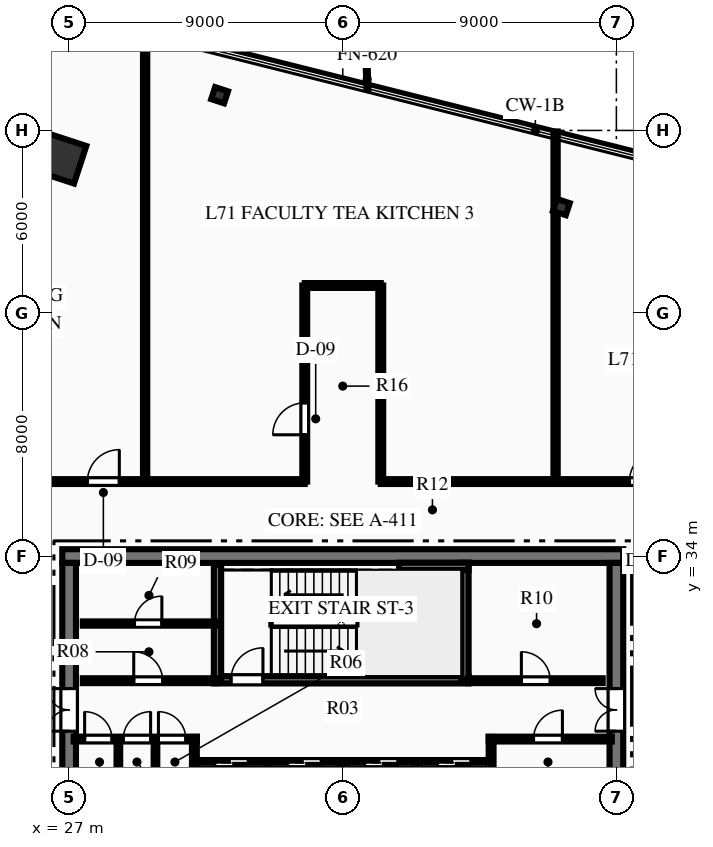
"""IFC4 building model, lengths in metres.
Left out: names, types, materials, properties, quantities, classifications, styles, units other than length and angle.
Written with IfcOpenShell. Run it as: python <this file> out.ifc"""

import sys

from ifc_helpers import new_model, si_unit, direction, frame, frame_2d, origin, origin_2d, place, context, subcontext, project, spatial, rectangle, hollow_rectangle, i_section, extrude, element, fill, save


model = new_model("IFC4")
c1 = context("Model", 3, precision=1e-05, world=origin(), true_north=direction((0.0, 1.0)))
c2 = subcontext(c1, "Body", "Model", "MODEL_VIEW")
j1 = project(units=[si_unit("LENGTHUNIT", "METRE"), si_unit("PLANEANGLEUNIT", "RADIAN")], contexts=[c1])
p1 = place(None, origin())
s1 = spatial("IfcSite", under=j1, at=p1, CompositionType="ELEMENT")
p2 = place(p1, origin())
s2 = spatial("IfcBuilding", under=s1, at=p2, CompositionType="ELEMENT")
p3 = place(p2, frame((0.0, 0.0, 282.45)))
s3 = spatial("IfcBuildingStorey", under=s2, at=p3, CompositionType="ELEMENT", Elevation=282.45)
p4 = place(p3, frame((26.775, 34.0, 0.0), z_axis=(0.0, 0.0, 1.0), x_axis=(1.0, 0.0, 0.0)))
e1 = element("IfcWall", 1, at=p4, inside=s3, PredefinedType="SHEAR", context=c2, shape_type="SweptSolid", body=[
    extrude(rectangle(XDim=18.45, YDim=0.45, at=frame_2d((9.225, 0.0))), origin(), (0.0, 0.0, 1.0), 3.75),
])
p5 = place(p3, frame((27.0, 18.225, 0.0), z_axis=(0.0, 0.0, 1.0), x_axis=(0.0, 1.0, 0.0)))
e2 = element("IfcWall", 2, at=p5, inside=s3, PredefinedType="SHEAR", context=c2, shape_type="SweptSolid", body=[
    extrude(rectangle(XDim=15.55, YDim=0.45, at=frame_2d((7.775, 0.0))), origin(), (0.0, 0.0, 1.0), 3.75),
])
p6 = place(p5, frame((10.015, 0.0, 0.0)))
e3 = element("IfcOpeningElement", 3, at=p6, cuts=e2, PredefinedType="OPENING", context=c2, shape_type="SweptSolid", body=[
    extrude(rectangle(XDim=1.4, YDim=2.2, at=frame_2d((0.7, 1.1))), frame((0.0, 0.235, 0.0), z_axis=(0.0, -1.0, 0.0), x_axis=(1.0, 0.0, 0.0)), (0.0, 0.0, 1.0), 0.47),
])
p7 = place(p3, frame((45.0, 18.225, 0.0), z_axis=(0.0, 0.0, 1.0), x_axis=(0.0, 1.0, 0.0)))
e4 = element("IfcWall", 4, at=p7, inside=s3, PredefinedType="SHEAR", context=c2, shape_type="SweptSolid", body=[
    extrude(rectangle(XDim=15.55, YDim=0.45, at=frame_2d((7.775, 0.0))), origin(), (0.0, 0.0, 1.0), 3.75),
])
p8 = place(p7, frame((10.015, 0.0, 0.0)))
e5 = element("IfcOpeningElement", 5, at=p8, cuts=e4, PredefinedType="OPENING", context=c2, shape_type="SweptSolid", body=[
    extrude(rectangle(XDim=1.4, YDim=2.2, at=frame_2d((0.7, 1.1))), frame((0.0, 0.235, 0.0), z_axis=(0.0, -1.0, 0.0), x_axis=(1.0, 0.0, 0.0)), (0.0, 0.0, 1.0), 0.47),
])
p9 = place(p3, frame((31.76, 29.93, 0.0), z_axis=(0.0, 0.0, 1.0), x_axis=(1.0, 0.0, 0.0)))
e6 = element("IfcWall", 6, at=p9, inside=s3, PredefinedType="SHEAR", context=c2, shape_type="SweptSolid", body=[
    extrude(rectangle(XDim=8.38, YDim=0.24, at=frame_2d((4.19, 0.0))), origin(), (0.0, 0.0, 1.0), 3.75),
])
p10 = place(p9, frame((0.565, 0.0, 0.0)))
e7 = element("IfcOpeningElement", 7, at=p10, cuts=e6, PredefinedType="OPENING", context=c2, shape_type="SweptSolid", body=[
    extrude(rectangle(XDim=1.05, YDim=2.15, at=frame_2d((0.525, 1.075))), frame((0.0, 0.13, 0.0), z_axis=(0.0, -1.0, 0.0), x_axis=(1.0, 0.0, 0.0)), (0.0, 0.0, 1.0), 0.26),
])
p11 = place(p3, frame((31.88, 29.93, 0.0), z_axis=(0.0, 0.0, 1.0), x_axis=(0.0, 1.0, 0.0)))
e8 = element("IfcWall", 8, at=p11, inside=s3, PredefinedType="SHEAR", context=c2, shape_type="SweptSolid", body=[
    extrude(rectangle(XDim=3.79, YDim=0.24, at=frame_2d((1.895, 0.0))), origin(), (0.0, 0.0, 1.0), 3.75),
])
p12 = place(p3, frame((40.02, 29.93, 0.0), z_axis=(0.0, 0.0, 1.0), x_axis=(0.0, 1.0, 0.0)))
e9 = element("IfcWall", 9, at=p12, inside=s3, PredefinedType="SHEAR", context=c2, shape_type="SweptSolid", body=[
    extrude(rectangle(XDim=3.85, YDim=0.24, at=frame_2d((1.925, 0.0))), origin(), (0.0, 0.0, 1.0), 3.75),
])
p13 = place(p3, frame((37.85, 33.66, 0.0), z_axis=(0.0, 0.0, 1.0), x_axis=(1.0, 0.0, 0.0)))
e10 = element("IfcWall", 10, at=p13, inside=s3, PredefinedType="SHEAR", context=c2, shape_type="SweptSolid", body=[
    extrude(rectangle(XDim=2.29, YDim=0.24, at=frame_2d((1.145, 0.0))), origin(), (0.0, 0.0, 1.0), 3.75),
])
p14 = place(p3, frame((26.745, 47.073, 0.0), z_axis=(0.0, 0.0, 1.0), x_axis=(0.311008203279, 0.950407227189, 0.0)))
e11 = element("IfcColumn", 11, at=p14, inside=s3, PredefinedType="COLUMN", context=c2, shape_type="SweptSolid", body=[
    extrude(hollow_rectangle(XDim=1.3, YDim=1.3, WallThickness=0.06, at=origin_2d()), origin(), (0.0, 0.0, 1.0), 3.75),
])
for number, where, z_axis, x_axis in (
    (12, (43.19, 45.48, 0.0), (0.0, 0.0, 1.0), (0.311, 0.95, 0.0)),
    (13, (31.949, 49.158, 0.0), (0.0, 0.0, 1.0), (0.311, 0.95, 0.0)),
):
    element("IfcColumn", number, at=place(p3, frame(where, z_axis=z_axis, x_axis=x_axis)), inside=s3, PredefinedType="COLUMN", context=c2, shape_type="SweptSolid", body=[
        extrude(i_section(OverallWidth=0.416, OverallDepth=0.445, WebThickness=0.039, FlangeThickness=0.063, at=origin_2d()), origin(), (0.0, 0.0, 1.0), 3.75),
    ])
p15 = place(p3, frame((27.15, 27.98, 0.0), z_axis=(0.0, 0.0, 1.0), x_axis=(1.0, 0.0, 0.0)))
e14 = element("IfcWall", 14, at=p15, inside=s3, PredefinedType="PARTITIONING", context=c2, shape_type="SweptSolid", body=[
    extrude(rectangle(XDim=4.05, YDim=0.16, at=frame_2d((2.025, 0.0))), origin(), (0.0, 0.0, 1.0), 3.48),
])
p16 = place(p15, frame((0.36, 0.0, 0.0)))
e15 = element("IfcOpeningElement", 15, at=p16, cuts=e14, PredefinedType="OPENING", context=c2, shape_type="SweptSolid", body=[
    extrude(rectangle(XDim=0.9, YDim=2.15, at=frame_2d((0.45, 1.075))), frame((0.0, 0.09, 0.0), z_axis=(0.0, -1.0, 0.0), x_axis=(1.0, 0.0, 0.0)), (0.0, 0.0, 1.0), 0.18),
])
p17 = place(p15, frame((1.63, 0.0, 0.0)))
e16 = element("IfcOpeningElement", 16, at=p17, cuts=e14, PredefinedType="OPENING", context=c2, shape_type="SweptSolid", body=[
    extrude(rectangle(XDim=0.9, YDim=2.15, at=frame_2d((0.45, 1.075))), frame((0.0, 0.09, 0.0), z_axis=(0.0, -1.0, 0.0), x_axis=(1.0, 0.0, 0.0)), (0.0, 0.0, 1.0), 0.18),
])
p18 = place(p15, frame((2.788, 0.0, 0.0)))
e17 = element("IfcOpeningElement", 17, at=p18, cuts=e14, PredefinedType="OPENING", context=c2, shape_type="SweptSolid", body=[
    extrude(rectangle(XDim=0.9, YDim=2.15, at=frame_2d((0.45, 1.075))), frame((0.0, 0.09, 0.0), z_axis=(0.0, -1.0, 0.0), x_axis=(1.0, 0.0, 0.0)), (0.0, 0.0, 1.0), 0.18),
])
p19 = place(p3, frame((31.12, 26.54, 0.0), z_axis=(0.0, 0.0, 1.0), x_axis=(0.0, 1.0, 0.0)))
e18 = element("IfcWall", 18, at=p19, inside=s3, PredefinedType="PARTITIONING", context=c2, shape_type="SweptSolid", body=[
    extrude(rectangle(XDim=1.51, YDim=0.16, at=frame_2d((0.755, 0.0))), origin(), (0.0, 0.0, 1.0), 3.48),
])
p20 = place(p3, frame((40.8, 27.98, 0.0), z_axis=(0.0, 0.0, 1.0), x_axis=(1.0, 0.0, 0.0)))
e19 = element("IfcWall", 19, at=p20, inside=s3, PredefinedType="PARTITIONING", context=c2, shape_type="SweptSolid", body=[
    extrude(rectangle(XDim=4.05, YDim=0.16, at=frame_2d((2.025, 0.0))), origin(), (0.0, 0.0, 1.0), 3.48),
])
p21 = place(p20, frame((1.475, 0.0, 0.0)))
e20 = element("IfcOpeningElement", 20, at=p21, cuts=e19, PredefinedType="OPENING", context=c2, shape_type="SweptSolid", body=[
    extrude(rectangle(XDim=0.95, YDim=2.15, at=frame_2d((0.475, 1.075))), frame((0.0, 0.09, 0.0), z_axis=(0.0, -1.0, 0.0), x_axis=(1.0, 0.0, 0.0)), (0.0, 0.0, 1.0), 0.18),
])
p22 = place(p3, frame((40.88, 26.54, 0.0), z_axis=(0.0, 0.0, 1.0), x_axis=(0.0, 1.0, 0.0)))
e21 = element("IfcWall", 21, at=p22, inside=s3, PredefinedType="PARTITIONING", context=c2, shape_type="SweptSolid", body=[
    extrude(rectangle(XDim=1.51, YDim=0.16, at=frame_2d((0.755, 0.0))), origin(), (0.0, 0.0, 1.0), 3.48),
])
for number, where, z_axis, x_axis in (
    (22, (28.62, 26.54, 0.0), (0.0, 0.0, 1.0), (0.0, 1.0, 0.0)),
    (23, (29.84, 26.54, 0.0), (0.0, 0.0, 1.0), (0.0, 1.0, 0.0)),
):
    element("IfcWall", number, at=place(p3, frame(where, z_axis=z_axis, x_axis=x_axis)), inside=s3, PredefinedType="PARTITIONING", context=c2, shape_type="SweptSolid", body=[
        extrude(rectangle(XDim=1.44, YDim=0.12, at=frame_2d((0.72, 0.0))), origin(), (0.0, 0.0, 1.0), 3.48),
    ])
p23 = place(p3, frame((27.45, 29.9, 0.0), z_axis=(0.0, 0.0, 1.0), x_axis=(1.0, 0.0, 0.0)))
e24 = element("IfcWall", 24, at=p23, inside=s3, PredefinedType="PARTITIONING", context=c2, shape_type="SweptSolid", body=[
    extrude(rectangle(XDim=4.43, YDim=0.16, at=frame_2d((2.215, 0.0))), origin(), (0.0, 0.0, 1.0), 3.48),
])
p24 = place(p23, frame((1.675, 0.0, 0.0)))
e25 = element("IfcOpeningElement", 25, at=p24, cuts=e24, PredefinedType="OPENING", context=c2, shape_type="SweptSolid", body=[
    extrude(rectangle(XDim=0.95, YDim=2.15, at=frame_2d((0.475, 1.075))), frame((0.0, 0.09, 0.0), z_axis=(0.0, -1.0, 0.0), x_axis=(1.0, 0.0, 0.0)), (0.0, 0.0, 1.0), 0.18),
])
p25 = place(p3, frame((27.45, 31.78, 0.0), z_axis=(0.0, 0.0, 1.0), x_axis=(1.0, 0.0, 0.0)))
e26 = element("IfcWall", 26, at=p25, inside=s3, PredefinedType="PARTITIONING", context=c2, shape_type="SweptSolid", body=[
    extrude(rectangle(XDim=4.35, YDim=0.14, at=frame_2d((2.175, 0.0))), origin(), (0.0, 0.0, 1.0), 3.48),
])
p26 = place(p25, frame((1.7, 0.0, 0.0)))
e27 = element("IfcOpeningElement", 27, at=p26, cuts=e26, PredefinedType="OPENING", context=c2, shape_type="SweptSolid", body=[
    extrude(rectangle(XDim=0.9, YDim=2.15, at=frame_2d((0.45, 1.075))), frame((0.0, 0.08, 0.0), z_axis=(0.0, -1.0, 0.0), x_axis=(1.0, 0.0, 0.0)), (0.0, 0.0, 1.0), 0.16),
])
p27 = place(p3, frame((40.12, 29.9, 0.0), z_axis=(0.0, 0.0, 1.0), x_axis=(1.0, 0.0, 0.0)))
e28 = element("IfcWall", 28, at=p27, inside=s3, PredefinedType="PARTITIONING", context=c2, shape_type="SweptSolid", body=[
    extrude(rectangle(XDim=4.43, YDim=0.16, at=frame_2d((2.215, 0.0))), origin(), (0.0, 0.0, 1.0), 3.48),
])
p28 = place(p27, frame((1.755, 0.0, 0.0)))
e29 = element("IfcOpeningElement", 29, at=p28, cuts=e28, PredefinedType="OPENING", context=c2, shape_type="SweptSolid", body=[
    extrude(rectangle(XDim=0.95, YDim=2.15, at=frame_2d((0.475, 1.075))), frame((0.0, 0.09, 0.0), z_axis=(0.0, -1.0, 0.0), x_axis=(1.0, 0.0, 0.0)), (0.0, 0.0, 1.0), 0.18),
])
p29 = place(p3, frame((31.2, 27.2, 0.0), z_axis=(0.0, 0.0, 1.0), x_axis=(1.0, 0.0, 0.0)))
e30 = element("IfcWall", 30, at=p29, inside=s3, PredefinedType="PARTITIONING", context=c2, shape_type="SweptSolid", body=[
    extrude(rectangle(XDim=9.6, YDim=0.18, at=frame_2d((4.8, 0.0))), origin(), (0.0, 0.0, 1.0), 3.48),
])
p30 = place(p29, frame((0.59, 0.0, 0.0)))
e31 = element("IfcOpeningElement", 31, at=p30, cuts=e30, PredefinedType="OPENING", context=c2, shape_type="SweptSolid", body=[
    extrude(rectangle(XDim=1.1, YDim=2.15, at=frame_2d((0.55, 1.075))), frame((0.0, 0.1, 0.0), z_axis=(0.0, -1.0, 0.0), x_axis=(1.0, 0.0, 0.0)), (0.0, 0.0, 1.0), 0.2),
])
p31 = place(p29, frame((2.99, 0.0, 0.0)))
e32 = element("IfcOpeningElement", 32, at=p31, cuts=e30, PredefinedType="OPENING", context=c2, shape_type="SweptSolid", body=[
    extrude(rectangle(XDim=1.1, YDim=2.15, at=frame_2d((0.55, 1.075))), frame((0.0, 0.1, 0.0), z_axis=(0.0, -1.0, 0.0), x_axis=(1.0, 0.0, 0.0)), (0.0, 0.0, 1.0), 0.2),
])
p32 = place(p29, frame((5.51, 0.0, 0.0)))
e33 = element("IfcOpeningElement", 33, at=p32, cuts=e30, PredefinedType="OPENING", context=c2, shape_type="SweptSolid", body=[
    extrude(rectangle(XDim=1.1, YDim=2.15, at=frame_2d((0.55, 1.075))), frame((0.0, 0.1, 0.0), z_axis=(0.0, -1.0, 0.0), x_axis=(1.0, 0.0, 0.0)), (0.0, 0.0, 1.0), 0.2),
])
p33 = place(p29, frame((7.91, 0.0, 0.0)))
e34 = element("IfcOpeningElement", 34, at=p33, cuts=e30, PredefinedType="OPENING", context=c2, shape_type="SweptSolid", body=[
    extrude(rectangle(XDim=1.1, YDim=2.15, at=frame_2d((0.55, 1.075))), frame((0.0, 0.1, 0.0), z_axis=(0.0, -1.0, 0.0), x_axis=(1.0, 0.0, 0.0)), (0.0, 0.0, 1.0), 0.2),
])
for number, where, z_axis, x_axis in (
    (35, (33.54, 25.3, 0.0), (0.0, 0.0, 1.0), (0.0, 1.0, 0.0)),
    (36, (36.0, 25.3, 0.0), (0.0, 0.0, 1.0), (0.0, 1.0, 0.0)),
    (37, (38.46, 25.3, 0.0), (0.0, 0.0, 1.0), (0.0, 1.0, 0.0)),
):
    element("IfcWall", number, at=place(p3, frame(where, z_axis=z_axis, x_axis=x_axis)), inside=s3, PredefinedType="PARTITIONING", context=c2, shape_type="SweptSolid", body=[
        extrude(rectangle(XDim=1.9, YDim=0.18, at=frame_2d((0.95, 0.0))), origin(), (0.0, 0.0, 1.0), 3.48),
    ])
p34 = place(p3, frame((24.5, 36.45, 0.0), z_axis=(0.0, 0.0, 1.0), x_axis=(1.0, 0.0, 0.0)))
e38 = element("IfcWall", 38, at=p34, inside=s3, PredefinedType="PARTITIONING", context=c2, shape_type="SweptSolid", body=[
    extrude(rectangle(XDim=10.25, YDim=0.16, at=frame_2d((5.125, 0.0))), origin(), (0.0, 0.0, 1.0), 3.48),
])
p35 = place(p34, frame((3.101, 0.0, 0.0)))
e39 = element("IfcOpeningElement", 39, at=p35, cuts=e38, PredefinedType="OPENING", context=c2, shape_type="SweptSolid", body=[
    extrude(rectangle(XDim=1.05, YDim=2.15, at=frame_2d((0.525, 1.075))), frame((0.0, 0.09, 0.0), z_axis=(0.0, -1.0, 0.0), x_axis=(1.0, 0.0, 0.0)), (0.0, 0.0, 1.0), 0.18),
])
p36 = place(p3, frame((37.25, 36.45, 0.0), z_axis=(0.0, 0.0, 1.0), x_axis=(1.0, 0.0, 0.0)))
e40 = element("IfcWall", 40, at=p36, inside=s3, PredefinedType="PARTITIONING", context=c2, shape_type="SweptSolid", body=[
    extrude(rectangle(XDim=10.25, YDim=0.16, at=frame_2d((5.125, 0.0))), origin(), (0.0, 0.0, 1.0), 3.48),
])
p37 = place(p36, frame((8.179, 0.0, 0.0)))
e41 = element("IfcOpeningElement", 41, at=p37, cuts=e40, PredefinedType="OPENING", context=c2, shape_type="SweptSolid", body=[
    extrude(rectangle(XDim=1.05, YDim=2.15, at=frame_2d((0.525, 1.075))), frame((0.0, 0.09, 0.0), z_axis=(0.0, -1.0, 0.0), x_axis=(1.0, 0.0, 0.0)), (0.0, 0.0, 1.0), 0.18),
])
p38 = place(p3, frame((34.75, 36.45, 0.0), z_axis=(0.0, 0.0, 1.0), x_axis=(0.0, 1.0, 0.0)))
e42 = element("IfcWall", 42, at=p38, inside=s3, PredefinedType="PARTITIONING", context=c2, shape_type="SweptSolid", body=[
    extrude(rectangle(XDim=6.45, YDim=0.16, at=frame_2d((3.225, 0.0))), origin(), (0.0, 0.0, 1.0), 3.48),
])
p39 = place(p38, frame((1.539, 0.0, 0.0)))
e43 = element("IfcOpeningElement", 43, at=p39, cuts=e42, PredefinedType="OPENING", context=c2, shape_type="SweptSolid", body=[
    extrude(rectangle(XDim=1.05, YDim=2.15, at=frame_2d((0.525, 1.075))), frame((0.0, 0.09, 0.0), z_axis=(0.0, -1.0, 0.0), x_axis=(1.0, 0.0, 0.0)), (0.0, 0.0, 1.0), 0.18),
])
p40 = place(p3, frame((37.25, 36.45, 0.0), z_axis=(0.0, 0.0, 1.0), x_axis=(0.0, 1.0, 0.0)))
e44 = element("IfcWall", 44, at=p40, inside=s3, PredefinedType="PARTITIONING", context=c2, shape_type="SweptSolid", body=[
    extrude(rectangle(XDim=6.45, YDim=0.16, at=frame_2d((3.225, 0.0))), origin(), (0.0, 0.0, 1.0), 3.48),
])
p41 = place(p3, frame((34.75, 42.9, 0.0), z_axis=(0.0, 0.0, 1.0), x_axis=(1.0, 0.0, 0.0)))
e45 = element("IfcWall", 45, at=p41, inside=s3, PredefinedType="PARTITIONING", context=c2, shape_type="SweptSolid", body=[
    extrude(rectangle(XDim=2.5, YDim=0.16, at=frame_2d((1.25, 0.0))), origin(), (0.0, 0.0, 1.0), 3.48),
])
p42 = place(p3, frame((29.5, 36.45, 0.0), z_axis=(0.0, 0.0, 1.0), x_axis=(0.0, 1.0, 0.0)))
e46 = element("IfcWall", 46, at=p42, inside=s3, PredefinedType="PARTITIONING", context=c2, shape_type="SweptSolid", body=[
    extrude(rectangle(XDim=14.907, YDim=0.14, at=frame_2d((7.454, 0.0))), origin(), (0.0, 0.0, 1.0), 3.48),
])
p43 = place(p3, frame((43.0, 36.45, 0.0), z_axis=(0.0, 0.0, 1.0), x_axis=(0.0, 1.0, 0.0)))
e47 = element("IfcWall", 47, at=p43, inside=s3, PredefinedType="PARTITIONING", context=c2, shape_type="SweptSolid", body=[
    extrude(rectangle(XDim=11.517, YDim=0.14, at=frame_2d((5.758, 0.0))), origin(), (0.0, 0.0, 1.0), 2.858),
])
p44 = place(p16, origin())
e48 = element("IfcDoor", 48, at=p44, inside=s3, OperationType="SINGLE_SWING_LEFT", PredefinedType="DOOR", context=c2, shape_type="SweptSolid", body=[
    extrude(rectangle(XDim=0.9, YDim=2.15, at=frame_2d((0.45, 1.075))), frame((0.0, 0.025, 0.0), z_axis=(0.0, -1.0, 0.0), x_axis=(1.0, 0.0, 0.0)), (0.0, 0.0, 1.0), 0.05),
])
fill(e15, e48)
p45 = place(p17, origin())
e49 = element("IfcDoor", 49, at=p45, inside=s3, OperationType="SINGLE_SWING_RIGHT", PredefinedType="DOOR", context=c2, shape_type="SweptSolid", body=[
    extrude(rectangle(XDim=0.9, YDim=2.15, at=frame_2d((0.45, 1.075))), frame((0.0, 0.025, 0.0), z_axis=(0.0, -1.0, 0.0), x_axis=(1.0, 0.0, 0.0)), (0.0, 0.0, 1.0), 0.05),
])
fill(e16, e49)
p46 = place(p18, origin())
e50 = element("IfcDoor", 50, at=p46, inside=s3, OperationType="SINGLE_SWING_LEFT", PredefinedType="DOOR", context=c2, shape_type="SweptSolid", body=[
    extrude(rectangle(XDim=0.9, YDim=2.15, at=frame_2d((0.45, 1.075))), frame((0.0, 0.025, 0.0), z_axis=(0.0, -1.0, 0.0), x_axis=(1.0, 0.0, 0.0)), (0.0, 0.0, 1.0), 0.05),
])
fill(e17, e50)
p47 = place(p21, origin())
e51 = element("IfcDoor", 51, at=p47, inside=s3, OperationType="SINGLE_SWING_RIGHT", PredefinedType="DOOR", context=c2, shape_type="SweptSolid", body=[
    extrude(rectangle(XDim=0.95, YDim=2.15, at=frame_2d((0.475, 1.075))), frame((0.0, 0.025, 0.0), z_axis=(0.0, -1.0, 0.0), x_axis=(1.0, 0.0, 0.0)), (0.0, 0.0, 1.0), 0.05),
])
fill(e20, e51)
p48 = place(p24, origin())
e52 = element("IfcDoor", 52, at=p48, inside=s3, OperationType="SINGLE_SWING_LEFT", PredefinedType="DOOR", context=c2, shape_type="SweptSolid", body=[
    extrude(rectangle(XDim=0.95, YDim=2.15, at=frame_2d((0.475, 1.075))), frame((0.0, 0.025, 0.0), z_axis=(0.0, -1.0, 0.0), x_axis=(1.0, 0.0, 0.0)), (0.0, 0.0, 1.0), 0.05),
])
fill(e25, e52)
p49 = place(p26, origin())
e53 = element("IfcDoor", 53, at=p49, inside=s3, OperationType="SINGLE_SWING_RIGHT", PredefinedType="DOOR", context=c2, shape_type="SweptSolid", body=[
    extrude(rectangle(XDim=0.9, YDim=2.15, at=frame_2d((0.45, 1.075))), frame((0.0, 0.025, 0.0), z_axis=(0.0, -1.0, 0.0), x_axis=(1.0, 0.0, 0.0)), (0.0, 0.0, 1.0), 0.05),
])
fill(e27, e53)
p50 = place(p28, origin())
e54 = element("IfcDoor", 54, at=p50, inside=s3, OperationType="SINGLE_SWING_LEFT", PredefinedType="DOOR", context=c2, shape_type="SweptSolid", body=[
    extrude(rectangle(XDim=0.95, YDim=2.15, at=frame_2d((0.475, 1.075))), frame((0.0, 0.025, 0.0), z_axis=(0.0, -1.0, 0.0), x_axis=(1.0, 0.0, 0.0)), (0.0, 0.0, 1.0), 0.05),
])
fill(e29, e54)
p51 = place(p10, origin())
e55 = element("IfcDoor", 55, at=p51, inside=s3, OperationType="SINGLE_SWING_RIGHT", PredefinedType="DOOR", context=c2, shape_type="SweptSolid", body=[
    extrude(rectangle(XDim=1.05, YDim=2.15, at=frame_2d((0.525, 1.075))), frame((0.0, 0.025, 0.0), z_axis=(0.0, -1.0, 0.0), x_axis=(1.0, 0.0, 0.0)), (0.0, 0.0, 1.0), 0.05),
])
fill(e7, e55)
p52 = place(p6, origin())
e56 = element("IfcDoor", 56, at=p52, inside=s3, OperationType="DOUBLE_DOOR_SINGLE_SWING", PredefinedType="DOOR", context=c2, shape_type="SweptSolid", body=[
    extrude(rectangle(XDim=1.4, YDim=2.2, at=frame_2d((0.7, 1.1))), frame((0.0, 0.025, 0.0), z_axis=(0.0, -1.0, 0.0), x_axis=(1.0, 0.0, 0.0)), (0.0, 0.0, 1.0), 0.05),
])
fill(e3, e56)
p53 = place(p8, origin())
e57 = element("IfcDoor", 57, at=p53, inside=s3, OperationType="DOUBLE_DOOR_SINGLE_SWING", PredefinedType="DOOR", context=c2, shape_type="SweptSolid", body=[
    extrude(rectangle(XDim=1.4, YDim=2.2, at=frame_2d((0.7, 1.1))), frame((0.0, 0.025, 0.0), z_axis=(0.0, -1.0, 0.0), x_axis=(1.0, 0.0, 0.0)), (0.0, 0.0, 1.0), 0.05),
])
fill(e5, e57)
p54 = place(p35, origin())
e58 = element("IfcDoor", 58, at=p54, inside=s3, OperationType="SINGLE_SWING_RIGHT", PredefinedType="DOOR", context=c2, shape_type="SweptSolid", body=[
    extrude(rectangle(XDim=1.05, YDim=2.15, at=frame_2d((0.525, 1.075))), frame((0.0, 0.025, 0.0), z_axis=(0.0, -1.0, 0.0), x_axis=(1.0, 0.0, 0.0)), (0.0, 0.0, 1.0), 0.05),
])
fill(e39, e58)
p55 = place(p39, origin())
e59 = element("IfcDoor", 59, at=p55, inside=s3, OperationType="SINGLE_SWING_LEFT", PredefinedType="DOOR", context=c2, shape_type="SweptSolid", body=[
    extrude(rectangle(XDim=1.05, YDim=2.15, at=frame_2d((0.525, 1.075))), frame((0.0, 0.025, 0.0), z_axis=(0.0, -1.0, 0.0), x_axis=(1.0, 0.0, 0.0)), (0.0, 0.0, 1.0), 0.05),
])
fill(e43, e59)
p56 = place(p37, origin())
e60 = element("IfcDoor", 60, at=p56, inside=s3, OperationType="SINGLE_SWING_RIGHT", PredefinedType="DOOR", context=c2, shape_type="SweptSolid", body=[
    extrude(rectangle(XDim=1.05, YDim=2.15, at=frame_2d((0.525, 1.075))), frame((0.0, 0.025, 0.0), z_axis=(0.0, -1.0, 0.0), x_axis=(1.0, 0.0, 0.0)), (0.0, 0.0, 1.0), 0.05),
])
fill(e41, e60)
p57 = place(p30, origin())
e61 = element("IfcDoor", 61, at=p57, inside=s3, OperationType="SLIDING_TO_LEFT", PredefinedType="DOOR", context=c2, shape_type="SweptSolid", body=[
    extrude(rectangle(XDim=1.1, YDim=2.15, at=frame_2d((0.55, 1.075))), frame((0.0, 0.025, 0.0), z_axis=(0.0, -1.0, 0.0), x_axis=(1.0, 0.0, 0.0)), (0.0, 0.0, 1.0), 0.05),
])
fill(e31, e61)
p58 = place(p31, origin())
e62 = element("IfcDoor", 62, at=p58, inside=s3, OperationType="SLIDING_TO_LEFT", PredefinedType="DOOR", context=c2, shape_type="SweptSolid", body=[
    extrude(rectangle(XDim=1.1, YDim=2.15, at=frame_2d((0.55, 1.075))), frame((0.0, 0.025, 0.0), z_axis=(0.0, -1.0, 0.0), x_axis=(1.0, 0.0, 0.0)), (0.0, 0.0, 1.0), 0.05),
])
fill(e32, e62)
p59 = place(p32, origin())
e63 = element("IfcDoor", 63, at=p59, inside=s3, OperationType="SLIDING_TO_LEFT", PredefinedType="DOOR", context=c2, shape_type="SweptSolid", body=[
    extrude(rectangle(XDim=1.1, YDim=2.15, at=frame_2d((0.55, 1.075))), frame((0.0, 0.025, 0.0), z_axis=(0.0, -1.0, 0.0), x_axis=(1.0, 0.0, 0.0)), (0.0, 0.0, 1.0), 0.05),
])
fill(e33, e63)
p60 = place(p33, origin())
e64 = element("IfcDoor", 64, at=p60, inside=s3, OperationType="SLIDING_TO_LEFT", PredefinedType="DOOR", context=c2, shape_type="SweptSolid", body=[
    extrude(rectangle(XDim=1.1, YDim=2.15, at=frame_2d((0.55, 1.075))), frame((0.0, 0.025, 0.0), z_axis=(0.0, -1.0, 0.0), x_axis=(1.0, 0.0, 0.0)), (0.0, 0.0, 1.0), 0.05),
])
fill(e34, e64)
save(model, sys.argv[1])
